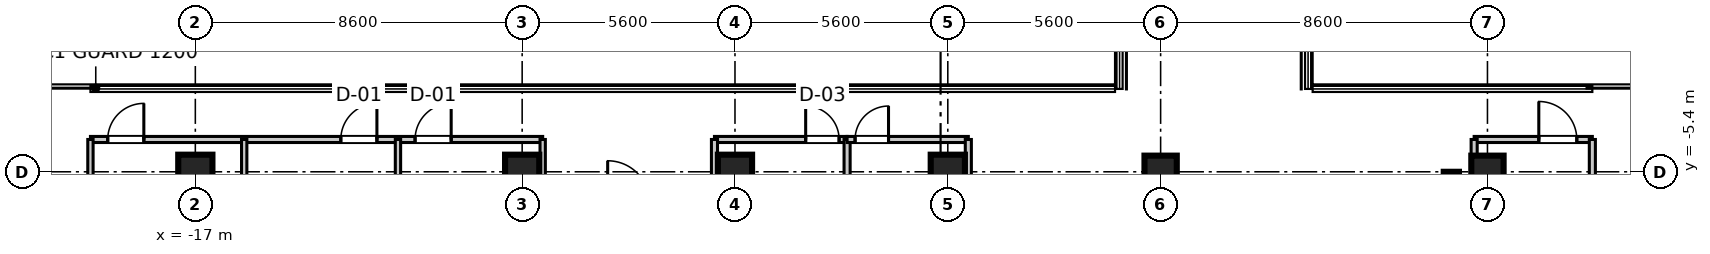
"""IFC4 building model, lengths in metres.
Left out: names, types, materials, properties, quantities, classifications, styles, units other than length and angle.
Written with IfcOpenShell. Run it as: python <this file> out.ifc"""

import sys

from ifc_helpers import new_model, si_unit, direction, frame, frame_2d, origin, origin_2d, place, context, subcontext, project, spatial, rectangle, extrude, source, transform, mapped, element, fill, save


model = new_model("IFC4")
c1 = context("Model", 3, precision=1e-05, world=origin(), true_north=direction((0.0, 1.0)))
c2 = subcontext(c1, "Body", "Model", "MODEL_VIEW")
j1 = project(units=[si_unit("LENGTHUNIT", "METRE"), si_unit("PLANEANGLEUNIT", "RADIAN")], contexts=[c1])
p1 = place(None, origin())
s1 = spatial("IfcSite", under=j1, at=p1, CompositionType="ELEMENT")
p2 = place(p1, origin())
s2 = spatial("IfcBuilding", under=s1, at=p2, CompositionType="ELEMENT")
p3 = place(p2, frame((0.0, 0.0, 304.2)))
s3 = spatial("IfcBuildingStorey", under=s2, at=p3, CompositionType="ELEMENT", Elevation=304.2)
m1 = source(origin(), c2, "Body", "SweptSolid", [
    extrude(rectangle(XDim=0.9, YDim=0.9, at=origin_2d()), origin(), (0.0, 0.0, 1.0), 3.805),
])
for number, where, z_axis, x_axis in (
    (1, (-17.0, -5.4, 0.0), (0.0, 0.0, 1.0), (1.0, 0.0, 0.0)),
    (2, (-8.4, -5.4, 0.0), (0.0, 0.0, 1.0), (1.0, 0.0, 0.0)),
    (3, (-2.8, -5.4, 0.0), (0.0, 0.0, 1.0), (1.0, 0.0, 0.0)),
    (4, (2.8, -5.4, 0.0), (0.0, 0.0, 1.0), (1.0, 0.0, 0.0)),
):
    element("IfcColumn", number, at=place(p3, frame(where, z_axis=z_axis, x_axis=x_axis)), inside=s3, PredefinedType="COLUMN", context=c2, shape_type="MappedRepresentation", body=[
        mapped(m1, transform((0.0, 0.0, 0.0), scale=1.0)),
    ])
m2 = source(origin(), c2, "Body", "SweptSolid", [
    extrude(rectangle(XDim=0.85, YDim=0.85, at=origin_2d()), origin(), (0.0, 0.0, 1.0), 3.805),
])
for number, where, z_axis, x_axis in (
    (5, (8.4, -5.4, 0.0), (0.0, 0.0, 1.0), (1.0, 0.0, 0.0)),
    (6, (17.0, -5.4, 0.0), (0.0, 0.0, 1.0), (1.0, 0.0, 0.0)),
):
    element("IfcColumn", number, at=place(p3, frame(where, z_axis=z_axis, x_axis=x_axis)), inside=s3, PredefinedType="PILASTER", context=c2, shape_type="MappedRepresentation", body=[
        mapped(m2, transform((0.0, 0.0, 0.0), scale=1.0)),
    ])
m3 = source(origin(), c2, "Body", "SweptSolid", [
    extrude(rectangle(XDim=11.6, YDim=0.4, at=frame_2d((5.8, 0.0))), origin(), (0.0, 0.0, 1.0), 3.55),
])
p4 = place(p3, frame((16.05, -17.0, 0.0), z_axis=(0.0, 0.0, 1.0), x_axis=(0.0, 1.0, 0.0)))
e7 = element("IfcWall", 7, at=p4, inside=s3, PredefinedType="SHEAR", context=c2, shape_type="MappedRepresentation", body=[
    mapped(m3, transform((0.0, 0.0, 0.0), scale=1.0)),
])
m4 = source(origin(), c2, "Body", "SweptSolid", [
    extrude(rectangle(XDim=3.11, YDim=0.16, at=frame_2d((1.555, 0.0))), origin(), (0.0, 0.0, 1.0), 2.89),
])
p5 = place(p3, frame((16.65, -4.55, 0.0), z_axis=(0.0, 0.0, 1.0), x_axis=(1.0, 0.0, 0.0)))
e8 = element("IfcWall", 8, at=p5, inside=s3, PredefinedType="PARTITIONING", context=c2, shape_type="MappedRepresentation", body=[
    mapped(m4, transform((0.0, 0.0, 0.0), scale=1.0)),
])
p6 = place(p5, frame((1.701, 0.0, 0.0)))
e9 = element("IfcOpeningElement", 9, at=p6, cuts=e8, PredefinedType="OPENING", context=c2, shape_type="SweptSolid", body=[
    extrude(rectangle(XDim=1.0, YDim=2.1, at=frame_2d((0.5, 1.05))), frame((0.0, 0.09, 0.0), z_axis=(0.0, -1.0, 0.0), x_axis=(1.0, 0.0, 0.0)), (0.0, 0.0, 1.0), 0.18),
])
m5 = source(origin(), c2, "Body", "SweptSolid", [
    extrude(rectangle(XDim=17.95, YDim=0.16, at=frame_2d((8.975, 0.0))), origin(), (0.0, 0.0, 1.0), 2.89),
])
p7 = place(p3, frame((16.65, -22.5, 0.0), z_axis=(0.0, 0.0, 1.0), x_axis=(0.0, 1.0, 0.0)))
e10 = element("IfcWall", 10, at=p7, inside=s3, PredefinedType="PARTITIONING", context=c2, shape_type="MappedRepresentation", body=[
    mapped(m5, transform((0.0, 0.0, 0.0), scale=1.0)),
])
m6 = source(origin(), c2, "Body", "SweptSolid", [
    extrude(rectangle(XDim=16.53, YDim=0.16, at=frame_2d((8.265, 0.0))), origin(), (0.0, 0.0, 1.0), 2.89),
])
p8 = place(p3, frame((19.76, -21.08, 0.0), z_axis=(0.0, 0.0, 1.0), x_axis=(0.0, 1.0, 0.0)))
e11 = element("IfcWall", 11, at=p8, inside=s3, PredefinedType="PARTITIONING", context=c2, shape_type="MappedRepresentation", body=[
    mapped(m6, transform((0.0, 0.0, 0.0), scale=1.0)),
])
m7 = source(origin(), c2, "Body", "SweptSolid", [
    extrude(rectangle(XDim=11.9, YDim=0.16, at=frame_2d((5.95, 0.0))), origin(), (0.0, 0.0, 1.0), 2.89),
])
p9 = place(p3, frame((-19.76, -4.55, 0.0), z_axis=(0.0, 0.0, 1.0), x_axis=(1.0, 0.0, 0.0)))
e12 = element("IfcWall", 12, at=p9, inside=s3, PredefinedType="PARTITIONING", context=c2, shape_type="MappedRepresentation", body=[
    mapped(m7, transform((0.0, 0.0, 0.0), scale=1.0)),
])
p10 = place(p9, frame((0.455, 0.0, 0.0)))
e13 = element("IfcOpeningElement", 13, at=p10, cuts=e12, PredefinedType="OPENING", context=c2, shape_type="SweptSolid", body=[
    extrude(rectangle(XDim=0.95, YDim=2.1, at=frame_2d((0.475, 1.05))), frame((0.0, 0.09, 0.0), z_axis=(0.0, -1.0, 0.0), x_axis=(1.0, 0.0, 0.0)), (0.0, 0.0, 1.0), 0.18),
])
p11 = place(p9, frame((6.588, 0.0, 0.0)))
e14 = element("IfcOpeningElement", 14, at=p11, cuts=e12, PredefinedType="OPENING", context=c2, shape_type="SweptSolid", body=[
    extrude(rectangle(XDim=0.95, YDim=2.1, at=frame_2d((0.475, 1.05))), frame((0.0, 0.09, 0.0), z_axis=(0.0, -1.0, 0.0), x_axis=(1.0, 0.0, 0.0)), (0.0, 0.0, 1.0), 0.18),
])
p12 = place(p9, frame((8.542, 0.0, 0.0)))
e15 = element("IfcOpeningElement", 15, at=p12, cuts=e12, PredefinedType="OPENING", context=c2, shape_type="SweptSolid", body=[
    extrude(rectangle(XDim=0.95, YDim=2.1, at=frame_2d((0.475, 1.05))), frame((0.0, 0.09, 0.0), z_axis=(0.0, -1.0, 0.0), x_axis=(1.0, 0.0, 0.0)), (0.0, 0.0, 1.0), 0.18),
])
m8 = source(origin(), c2, "Body", "SweptSolid", [
    extrude(rectangle(XDim=16.53, YDim=0.14, at=frame_2d((8.265, 0.0))), origin(), (0.0, 0.0, 1.0), 2.89),
])
p13 = place(p3, frame((-19.76, -21.08, 0.0), z_axis=(0.0, 0.0, 1.0), x_axis=(0.0, 1.0, 0.0)))
e16 = element("IfcWall", 16, at=p13, inside=s3, PredefinedType="PARTITIONING", context=c2, shape_type="MappedRepresentation", body=[
    mapped(m8, transform((0.0, 0.0, 0.0), scale=1.0)),
])
m9 = source(origin(), c2, "Body", "SweptSolid", [
    extrude(rectangle(XDim=17.95, YDim=0.14, at=frame_2d((8.975, 0.0))), origin(), (0.0, 0.0, 1.0), 2.89),
])
for number, where, z_axis, x_axis in (
    (17, (-7.86, -22.5, 0.0), (0.0, 0.0, 1.0), (0.0, 1.0, 0.0)),
    (18, (-15.714, -22.5, 0.0), (0.0, 0.0, 1.0), (0.0, 1.0, 0.0)),
    (19, (-11.668, -22.5, 0.0), (0.0, 0.0, 1.0), (0.0, 1.0, 0.0)),
):
    element("IfcWall", number, at=place(p3, frame(where, z_axis=z_axis, x_axis=x_axis)), inside=s3, PredefinedType="PARTITIONING", context=c2, shape_type="MappedRepresentation", body=[
        mapped(m9, transform((0.0, 0.0, 0.0), scale=1.0)),
    ])
m10 = source(origin(), c2, "Body", "SweptSolid", [
    extrude(rectangle(XDim=3.49, YDim=0.16, at=frame_2d((1.745, 0.0))), origin(), (0.0, 0.0, 1.0), 2.89),
])
p14 = place(p3, frame((-3.34, -4.55, 0.0), z_axis=(0.0, 0.0, 1.0), x_axis=(1.0, 0.0, 0.0)))
e20 = element("IfcWall", 20, at=p14, inside=s3, PredefinedType="PARTITIONING", context=c2, shape_type="MappedRepresentation", body=[
    mapped(m10, transform((0.0, 0.0, 0.0), scale=1.0)),
])
p15 = place(p14, frame((2.4, 0.0, 0.0)))
e21 = element("IfcOpeningElement", 21, at=p15, cuts=e20, PredefinedType="OPENING", context=c2, shape_type="SweptSolid", body=[
    extrude(rectangle(XDim=0.88, YDim=2.1, at=frame_2d((0.44, 1.05))), frame((0.0, 0.09, 0.0), z_axis=(0.0, -1.0, 0.0), x_axis=(1.0, 0.0, 0.0)), (0.0, 0.0, 1.0), 0.18),
])
for number, where, z_axis, x_axis in (
    (22, (-3.34, -22.5, 0.0), (0.0, 0.0, 1.0), (0.0, 1.0, 0.0)),
    (23, (0.15, -22.5, 0.0), (0.0, 0.0, 1.0), (0.0, 1.0, 0.0)),
):
    element("IfcWall", number, at=place(p3, frame(where, z_axis=z_axis, x_axis=x_axis)), inside=s3, PredefinedType="PARTITIONING", context=c2, shape_type="MappedRepresentation", body=[
        mapped(m5, transform((0.0, 0.0, 0.0), scale=1.0)),
    ])
m11 = source(origin(), c2, "Body", "SweptSolid", [
    extrude(rectangle(XDim=3.19, YDim=0.16, at=frame_2d((1.595, 0.0))), origin(), (0.0, 0.0, 1.0), 2.89),
])
p16 = place(p3, frame((0.15, -4.55, 0.0), z_axis=(0.0, 0.0, 1.0), x_axis=(1.0, 0.0, 0.0)))
e24 = element("IfcWall", 24, at=p16, inside=s3, PredefinedType="PARTITIONING", context=c2, shape_type="MappedRepresentation", body=[
    mapped(m11, transform((0.0, 0.0, 0.0), scale=1.0)),
])
p17 = place(p16, frame((0.21, 0.0, 0.0)))
e25 = element("IfcOpeningElement", 25, at=p17, cuts=e24, PredefinedType="OPENING", context=c2, shape_type="SweptSolid", body=[
    extrude(rectangle(XDim=0.88, YDim=2.1, at=frame_2d((0.44, 1.05))), frame((0.0, 0.09, 0.0), z_axis=(0.0, -1.0, 0.0), x_axis=(1.0, 0.0, 0.0)), (0.0, 0.0, 1.0), 0.18),
])
p18 = place(p3, frame((3.34, -22.5, 0.0), z_axis=(0.0, 0.0, 1.0), x_axis=(0.0, 1.0, 0.0)))
e26 = element("IfcWall", 26, at=p18, inside=s3, PredefinedType="PARTITIONING", context=c2, shape_type="MappedRepresentation", body=[
    mapped(m5, transform((0.0, 0.0, 0.0), scale=1.0)),
])
m12 = source(origin(), c2, "Body", "SweptSolid", [
    extrude(rectangle(XDim=1.0, YDim=2.1, at=frame_2d((0.5, 1.05))), frame((0.0, 0.025, 0.0), z_axis=(0.0, -1.0, 0.0), x_axis=(1.0, 0.0, 0.0)), (0.0, 0.0, 1.0), 0.05),
])
p19 = place(p6, frame((1.0, 0.0, 0.0), z_axis=(0.0, 0.0, 1.0), x_axis=(-1.0, 0.0, 0.0)))
e27 = element("IfcDoor", 27, at=p19, inside=s3, OperationType="SINGLE_SWING_LEFT", PredefinedType="DOOR", context=c2, shape_type="MappedRepresentation", body=[
    mapped(m12, transform((0.0, 0.0, 0.0), scale=1.0)),
])
fill(e9, e27)
m13 = source(origin(), c2, "Body", "SweptSolid", [
    extrude(rectangle(XDim=0.95, YDim=2.1, at=frame_2d((0.475, 1.05))), frame((0.0, 0.025, 0.0), z_axis=(0.0, -1.0, 0.0), x_axis=(1.0, 0.0, 0.0)), (0.0, 0.0, 1.0), 0.05),
])
p20 = place(p10, frame((0.95, 0.0, 0.0), z_axis=(0.0, 0.0, 1.0), x_axis=(-1.0, 0.0, 0.0)))
e28 = element("IfcDoor", 28, at=p20, inside=s3, OperationType="SINGLE_SWING_RIGHT", PredefinedType="DOOR", context=c2, shape_type="MappedRepresentation", body=[
    mapped(m13, transform((0.0, 0.0, 0.0), scale=1.0)),
])
fill(e13, e28)
p21 = place(p11, frame((0.95, 0.0, 0.0), z_axis=(0.0, 0.0, 1.0), x_axis=(-1.0, 0.0, 0.0)))
e29 = element("IfcDoor", 29, at=p21, inside=s3, OperationType="SINGLE_SWING_RIGHT", PredefinedType="DOOR", context=c2, shape_type="MappedRepresentation", body=[
    mapped(m13, transform((0.0, 0.0, 0.0), scale=1.0)),
])
fill(e14, e29)
p22 = place(p12, frame((0.95, 0.0, 0.0), z_axis=(0.0, 0.0, 1.0), x_axis=(-1.0, 0.0, 0.0)))
e30 = element("IfcDoor", 30, at=p22, inside=s3, OperationType="SINGLE_SWING_RIGHT", PredefinedType="DOOR", context=c2, shape_type="MappedRepresentation", body=[
    mapped(m13, transform((0.0, 0.0, 0.0), scale=1.0)),
])
fill(e15, e30)
m14 = source(origin(), c2, "Body", "SweptSolid", [
    extrude(rectangle(XDim=0.88, YDim=2.1, at=frame_2d((0.44, 1.05))), frame((0.0, 0.025, 0.0), z_axis=(0.0, -1.0, 0.0), x_axis=(1.0, 0.0, 0.0)), (0.0, 0.0, 1.0), 0.05),
])
p23 = place(p15, frame((0.88, 0.0, 0.0), z_axis=(0.0, 0.0, 1.0), x_axis=(-1.0, 0.0, 0.0)))
e31 = element("IfcDoor", 31, at=p23, inside=s3, OperationType="SINGLE_SWING_LEFT", PredefinedType="DOOR", context=c2, shape_type="MappedRepresentation", body=[
    mapped(m14, transform((0.0, 0.0, 0.0), scale=1.0)),
])
fill(e21, e31)
p24 = place(p17, frame((0.88, 0.0, 0.0), z_axis=(0.0, 0.0, 1.0), x_axis=(-1.0, 0.0, 0.0)))
e32 = element("IfcDoor", 32, at=p24, inside=s3, OperationType="SINGLE_SWING_RIGHT", PredefinedType="DOOR", context=c2, shape_type="MappedRepresentation", body=[
    mapped(m14, transform((0.0, 0.0, 0.0), scale=1.0)),
])
fill(e25, e32)
save(model, sys.argv[1])
